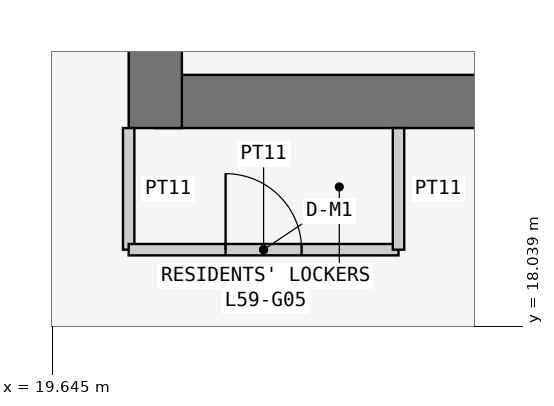
"""IFC4 building model, lengths in metres.
Left out: names, types, materials, properties, quantities, classifications, styles, units other than length and angle.
Written with IfcOpenShell. Run it as: python <this file> out.ifc"""

import sys

from ifc_helpers import new_model, si_unit, direction, frame, frame_2d, origin, place, context, subcontext, project, spatial, rectangle, extrude, element, fill, save


model = new_model("IFC4")
c1 = context("Model", 3, precision=1e-05, world=origin(), true_north=direction((0.0, 1.0)))
c2 = subcontext(c1, "Body", "Model", "MODEL_VIEW")
j1 = project(units=[si_unit("LENGTHUNIT", "METRE"), si_unit("PLANEANGLEUNIT", "RADIAN")], contexts=[c1])
p1 = place(None, origin())
s1 = spatial("IfcSite", under=j1, at=p1, CompositionType="ELEMENT")
p2 = place(p1, origin())
s2 = spatial("IfcBuilding", under=s1, at=p2, CompositionType="ELEMENT")
p3 = place(p2, frame((0.0, 0.0, 226.5)))
s3 = spatial("IfcBuildingStorey", under=s2, at=p3, CompositionType="ELEMENT", Elevation=226.5)
p4 = place(p3, frame((21.0, 21.0, 0.0), z_axis=(0.0, 0.0, 1.0), x_axis=(1.0, 0.0, 0.0)))
e1 = element("IfcWall", 1, at=p4, inside=s3, PredefinedType="SHEAR", context=c2, shape_type="SweptSolid", body=[
    extrude(rectangle(XDim=17.15, YDim=0.7, at=frame_2d((8.575, 0.0))), origin(), (0.0, 0.0, 1.0), 3.6),
])
p5 = place(p3, frame((21.0, 37.8, 0.0), z_axis=(0.0, 0.0, 1.0), x_axis=(0.0, -1.0, 0.0)))
e2 = element("IfcWall", 2, at=p5, inside=s3, PredefinedType="SHEAR", context=c2, shape_type="SweptSolid", body=[
    extrude(rectangle(XDim=17.15, YDim=0.7, at=frame_2d((8.575, 0.0))), origin(), (0.0, 0.0, 1.0), 3.6),
])
p6 = place(p5, frame((5.4, 0.0, 0.0)))
e3 = element("IfcOpeningElement", 3, at=p6, cuts=e2, PredefinedType="OPENING", context=c2, shape_type="SweptSolid", body=[
    extrude(rectangle(XDim=1.2, YDim=2.1, at=frame_2d((0.6, 1.05))), frame((0.0, 0.36, 0.0), z_axis=(0.0, -1.0, 0.0), x_axis=(1.0, 0.0, 0.0)), (0.0, 0.0, 1.0), 0.72),
])
p7 = place(p3, frame((20.65, 20.65, 0.0), z_axis=(0.0, 0.0, 1.0), x_axis=(0.0, -1.0, 0.0)))
e4 = element("IfcWall", 4, at=p7, inside=s3, PredefinedType="PARTITIONING", context=c2, shape_type="SweptSolid", body=[
    extrude(rectangle(XDim=1.6, YDim=0.15, at=frame_2d((0.8, 0.0))), origin(), (0.0, 0.0, 1.0), 3.45),
])
p8 = place(p3, frame((20.65, 19.05, 0.0), z_axis=(0.0, 0.0, 1.0), x_axis=(1.0, 0.0, 0.0)))
e5 = element("IfcWall", 5, at=p8, inside=s3, PredefinedType="PARTITIONING", context=c2, shape_type="SweptSolid", body=[
    extrude(rectangle(XDim=3.55, YDim=0.15, at=frame_2d((1.775, 0.0))), origin(), (0.0, 0.0, 1.0), 3.45),
])
p9 = place(p8, frame((1.275, 0.0, 0.0)))
e6 = element("IfcOpeningElement", 6, at=p9, cuts=e5, PredefinedType="OPENING", context=c2, shape_type="SweptSolid", body=[
    extrude(rectangle(XDim=1.0, YDim=2.1, at=frame_2d((0.5, 1.05))), frame((0.0, 0.085, 0.0), z_axis=(0.0, -1.0, 0.0), x_axis=(1.0, 0.0, 0.0)), (0.0, 0.0, 1.0), 0.17),
])
p10 = place(p3, frame((24.2, 19.05, 0.0), z_axis=(0.0, 0.0, 1.0), x_axis=(0.0, 1.0, 0.0)))
e7 = element("IfcWall", 7, at=p10, inside=s3, PredefinedType="PARTITIONING", context=c2, shape_type="SweptSolid", body=[
    extrude(rectangle(XDim=1.6, YDim=0.15, at=frame_2d((0.8, 0.0))), origin(), (0.0, 0.0, 1.0), 3.45),
])
p11 = place(p9, origin())
e8 = element("IfcDoor", 8, at=p11, inside=s3, OperationType="SINGLE_SWING_LEFT", PredefinedType="DOOR", context=c2, shape_type="SweptSolid", body=[
    extrude(rectangle(XDim=1.0, YDim=2.1, at=frame_2d((0.5, 1.05))), frame((0.0, 0.025, 0.0), z_axis=(0.0, -1.0, 0.0), x_axis=(1.0, 0.0, 0.0)), (0.0, 0.0, 1.0), 0.05),
])
fill(e6, e8)
save(model, sys.argv[1])
